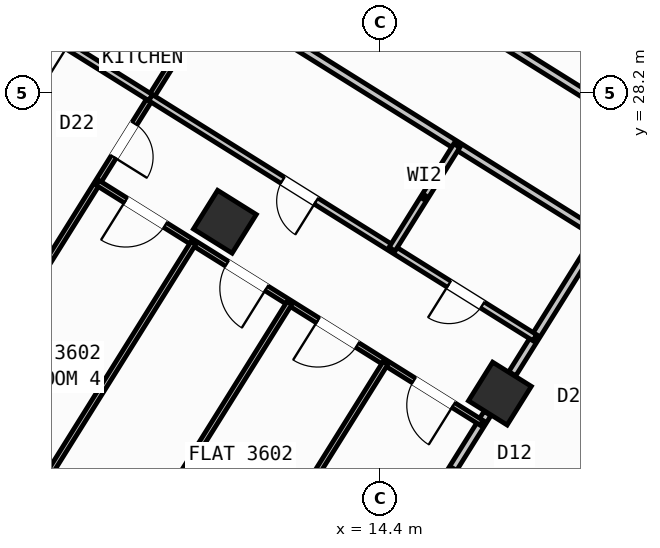
"""IFC4 building model, lengths in metres.
Left out: names, types, materials, properties, quantities, classifications, styles, units other than length and angle.
Written with IfcOpenShell. Run it as: python <this file> out.ifc"""

import sys

from ifc_helpers import new_model, si_unit, direction, frame, frame_2d, origin, origin_2d, place, context, subcontext, project, spatial, rectangle, hollow_rectangle, extrude, source, transform, mapped, element, fill, save


model = new_model("IFC4")
c1 = context("Model", 3, precision=1e-05, world=origin(), true_north=direction((0.0, 1.0)))
c2 = subcontext(c1, "Body", "Model", "MODEL_VIEW")
j1 = project(units=[si_unit("LENGTHUNIT", "METRE"), si_unit("PLANEANGLEUNIT", "RADIAN")], contexts=[c1])
p1 = place(None, origin())
s1 = spatial("IfcSite", under=j1, at=p1, CompositionType="ELEMENT")
p2 = place(p1, origin())
s2 = spatial("IfcBuilding", under=s1, at=p2, CompositionType="ELEMENT")
p3 = place(p2, frame((0.0, 0.0, 144.3)))
s3 = spatial("IfcBuildingStorey", under=s2, at=p3, CompositionType="ELEMENT", Elevation=144.3)
m1 = source(origin(), c2, "Body", "SweptSolid", [
    extrude(hollow_rectangle(XDim=0.9, YDim=0.9, WallThickness=0.036, at=origin_2d()), origin(), (0.0, 0.0, 1.0), 3.6),
])
for number, where, z_axis, x_axis in (
    (1, (16.764, 22.261, 0.0), (0.0, 0.0, 1.0), (-0.848, 0.53, 0.0)),
    (2, (11.336, 25.653, 0.0), (0.0, 0.0, 1.0), (-0.848, 0.53, 0.0)),
):
    element("IfcColumn", number, at=place(p3, frame(where, z_axis=z_axis, x_axis=x_axis)), inside=s3, PredefinedType="COLUMN", context=c2, shape_type="MappedRepresentation", body=[
        mapped(m1, transform((0.0, 0.0, 0.0), scale=1.0)),
    ])
p4 = place(p3, frame((29.268, 6.429, 0.0), z_axis=(0.0, 0.0, 1.0), x_axis=(-0.848049971435, 0.529916263149, 0.0)))
e3 = element("IfcWall", 3, at=p4, inside=s3, PredefinedType="STANDARD", context=c2, shape_type="SweptSolid", body=[
    extrude(rectangle(XDim=31.588, YDim=0.32, at=frame_2d((15.794, 0.0))), origin(), (0.0, 0.0, 1.0), 3.35),
])
p5 = place(p4, frame((16.362, 0.0, 0.0)))
e4 = element("IfcOpeningElement", 4, at=p5, cuts=e3, PredefinedType="OPENING", context=c2, shape_type="SweptSolid", body=[
    extrude(rectangle(XDim=1.2, YDim=2.15, at=frame_2d((0.6, 1.075))), frame((0.0, 0.17, 0.0), z_axis=(0.0, -1.0, 0.0), x_axis=(1.0, 0.0, 0.0)), (0.0, 0.0, 1.0), 0.34),
])
p6 = place(p4, frame((2.989, 0.0, 0.8)))
e5 = element("IfcOpeningElement", 5, at=p6, cuts=e3, PredefinedType="OPENING", context=c2, shape_type="SweptSolid", body=[
    extrude(rectangle(XDim=2.1, YDim=1.55, at=frame_2d((1.05, 0.775))), frame((0.0, 0.17, 0.0), z_axis=(0.0, -1.0, 0.0), x_axis=(1.0, 0.0, 0.0)), (0.0, 0.0, 1.0), 0.34),
])
p7 = place(p4, frame((8.359, 0.0, 0.8)))
e6 = element("IfcOpeningElement", 6, at=p7, cuts=e3, PredefinedType="OPENING", context=c2, shape_type="SweptSolid", body=[
    extrude(rectangle(XDim=2.1, YDim=1.55, at=frame_2d((1.05, 0.775))), frame((0.0, 0.17, 0.0), z_axis=(0.0, -1.0, 0.0), x_axis=(1.0, 0.0, 0.0)), (0.0, 0.0, 1.0), 0.34),
])
p8 = place(p4, frame((13.284, 0.0, 0.95)))
e7 = element("IfcOpeningElement", 7, at=p8, cuts=e3, PredefinedType="OPENING", context=c2, shape_type="SweptSolid", body=[
    extrude(rectangle(XDim=1.2, YDim=1.4, at=frame_2d((0.6, 0.7))), frame((0.0, 0.17, 0.0), z_axis=(0.0, -1.0, 0.0), x_axis=(1.0, 0.0, 0.0)), (0.0, 0.0, 1.0), 0.34),
])
p9 = place(p4, frame((29.188, 0.0, 0.95)))
e8 = element("IfcOpeningElement", 8, at=p9, cuts=e3, PredefinedType="OPENING", context=c2, shape_type="SweptSolid", body=[
    extrude(rectangle(XDim=1.2, YDim=1.4, at=frame_2d((0.6, 0.7))), frame((0.0, 0.17, 0.0), z_axis=(0.0, -1.0, 0.0), x_axis=(1.0, 0.0, 0.0)), (0.0, 0.0, 1.0), 0.34),
])
p10 = place(p4, frame((19.674, 0.0, 1.0)))
e9 = element("IfcOpeningElement", 9, at=p10, cuts=e3, PredefinedType="OPENING", context=c2, shape_type="SweptSolid", body=[
    extrude(rectangle(XDim=0.9, YDim=1.25, at=frame_2d((0.45, 0.625))), frame((0.0, 0.17, 0.0), z_axis=(0.0, -1.0, 0.0), x_axis=(1.0, 0.0, 0.0)), (0.0, 0.0, 1.0), 0.34),
])
p11 = place(p4, frame((21.896, 0.0, 1.0)))
e10 = element("IfcOpeningElement", 10, at=p11, cuts=e3, PredefinedType="OPENING", context=c2, shape_type="SweptSolid", body=[
    extrude(rectangle(XDim=0.9, YDim=1.25, at=frame_2d((0.45, 0.625))), frame((0.0, 0.17, 0.0), z_axis=(0.0, -1.0, 0.0), x_axis=(1.0, 0.0, 0.0)), (0.0, 0.0, 1.0), 0.34),
])
p12 = place(p4, frame((24.106, 0.0, 1.0)))
e11 = element("IfcOpeningElement", 11, at=p12, cuts=e3, PredefinedType="OPENING", context=c2, shape_type="SweptSolid", body=[
    extrude(rectangle(XDim=0.65, YDim=1.15, at=frame_2d((0.325, 0.575))), frame((0.0, 0.17, 0.0), z_axis=(0.0, -1.0, 0.0), x_axis=(1.0, 0.0, 0.0)), (0.0, 0.0, 1.0), 0.34),
])
p13 = place(p4, frame((26.366, 0.0, 1.0)))
e12 = element("IfcOpeningElement", 12, at=p13, cuts=e3, PredefinedType="OPENING", context=c2, shape_type="SweptSolid", body=[
    extrude(rectangle(XDim=0.9, YDim=1.25, at=frame_2d((0.45, 0.625))), frame((0.0, 0.17, 0.0), z_axis=(0.0, -1.0, 0.0), x_axis=(1.0, 0.0, 0.0)), (0.0, 0.0, 1.0), 0.34),
])
p14 = place(p3, frame((2.415, 23.452, 0.0), z_axis=(0.0, 0.0, 1.0), x_axis=(0.52991049553, 0.848053575387, 0.0)))
e13 = element("IfcWall", 13, at=p14, inside=s3, PredefinedType="STANDARD", context=c2, shape_type="SweptSolid", body=[
    extrude(rectangle(XDim=21.587, YDim=0.32, at=frame_2d((10.794, 0.0))), origin(), (0.0, 0.0, 1.0), 2.775),
])
p15 = place(p14, frame((2.356, 0.0, 0.8)))
e14 = element("IfcOpeningElement", 14, at=p15, cuts=e13, PredefinedType="OPENING", context=c2, shape_type="SweptSolid", body=[
    extrude(rectangle(XDim=2.1, YDim=1.55, at=frame_2d((1.05, 0.775))), frame((0.0, 0.17, 0.0), z_axis=(0.0, -1.0, 0.0), x_axis=(1.0, 0.0, 0.0)), (0.0, 0.0, 1.0), 0.34),
])
p16 = place(p14, frame((8.639, 0.0, 1.0)))
e15 = element("IfcOpeningElement", 15, at=p16, cuts=e13, PredefinedType="OPENING", context=c2, shape_type="SweptSolid", body=[
    extrude(rectangle(XDim=0.9, YDim=1.25, at=frame_2d((0.45, 0.625))), frame((0.0, 0.17, 0.0), z_axis=(0.0, -1.0, 0.0), x_axis=(1.0, 0.0, 0.0)), (0.0, 0.0, 1.0), 0.34),
])
p17 = place(p14, frame((17.744, 0.0, 0.85)))
e16 = element("IfcOpeningElement", 16, at=p17, cuts=e13, PredefinedType="OPENING", context=c2, shape_type="SweptSolid", body=[
    extrude(rectangle(XDim=1.5, YDim=1.5, at=frame_2d((0.75, 0.75))), frame((0.0, 0.17, 0.0), z_axis=(0.0, -1.0, 0.0), x_axis=(1.0, 0.0, 0.0)), (0.0, 0.0, 1.0), 0.34),
])
p18 = place(p3, frame((14.138, 41.825, 0.0), z_axis=(0.0, 0.0, 1.0), x_axis=(0.848046498049, -0.529921821731, 0.0)))
e17 = element("IfcWall", 17, at=p18, inside=s3, PredefinedType="STANDARD", context=c2, shape_type="SweptSolid", body=[
    extrude(rectangle(XDim=31.588, YDim=0.32, at=frame_2d((15.794, 0.0))), origin(), (0.0, 0.0, 1.0), 3.35),
])
p19 = place(p18, frame((2.949, 0.0, 0.0)))
e18 = element("IfcOpeningElement", 18, at=p19, cuts=e17, PredefinedType="OPENING", context=c2, shape_type="SweptSolid", body=[
    extrude(rectangle(XDim=1.05, YDim=2.15, at=frame_2d((0.525, 1.075))), frame((0.0, 0.17, 0.0), z_axis=(0.0, -1.0, 0.0), x_axis=(1.0, 0.0, 0.0)), (0.0, 0.0, 1.0), 0.34),
])
p20 = place(p18, frame((0.861, 0.0, 0.85)))
e19 = element("IfcOpeningElement", 19, at=p20, cuts=e17, PredefinedType="OPENING", context=c2, shape_type="SweptSolid", body=[
    extrude(rectangle(XDim=1.5, YDim=1.5, at=frame_2d((0.75, 0.75))), frame((0.0, 0.17, 0.0), z_axis=(0.0, -1.0, 0.0), x_axis=(1.0, 0.0, 0.0)), (0.0, 0.0, 1.0), 0.34),
])
p21 = place(p18, frame((8.494, 0.0, 0.85)))
e20 = element("IfcOpeningElement", 20, at=p21, cuts=e17, PredefinedType="OPENING", context=c2, shape_type="SweptSolid", body=[
    extrude(rectangle(XDim=1.8, YDim=1.5, at=frame_2d((0.9, 0.75))), frame((0.0, 0.17, 0.0), z_axis=(0.0, -1.0, 0.0), x_axis=(1.0, 0.0, 0.0)), (0.0, 0.0, 1.0), 0.34),
])
p22 = place(p18, frame((13.874, 0.0, 0.85)))
e21 = element("IfcOpeningElement", 21, at=p22, cuts=e17, PredefinedType="OPENING", context=c2, shape_type="SweptSolid", body=[
    extrude(rectangle(XDim=1.5, YDim=1.5, at=frame_2d((0.75, 0.75))), frame((0.0, 0.17, 0.0), z_axis=(0.0, -1.0, 0.0), x_axis=(1.0, 0.0, 0.0)), (0.0, 0.0, 1.0), 0.34),
])
p23 = place(p18, frame((17.104, 0.0, 1.0)))
e22 = element("IfcOpeningElement", 22, at=p23, cuts=e17, PredefinedType="OPENING", context=c2, shape_type="SweptSolid", body=[
    extrude(rectangle(XDim=0.9, YDim=1.25, at=frame_2d((0.45, 0.625))), frame((0.0, 0.17, 0.0), z_axis=(0.0, -1.0, 0.0), x_axis=(1.0, 0.0, 0.0)), (0.0, 0.0, 1.0), 0.34),
])
p24 = place(p18, frame((22.144, 0.0, 1.0)))
e23 = element("IfcOpeningElement", 23, at=p24, cuts=e17, PredefinedType="OPENING", context=c2, shape_type="SweptSolid", body=[
    extrude(rectangle(XDim=0.9, YDim=1.25, at=frame_2d((0.45, 0.625))), frame((0.0, 0.17, 0.0), z_axis=(0.0, -1.0, 0.0), x_axis=(1.0, 0.0, 0.0)), (0.0, 0.0, 1.0), 0.34),
])
p25 = place(p18, frame((27.744, 0.0, 1.0)))
e24 = element("IfcOpeningElement", 24, at=p25, cuts=e17, PredefinedType="OPENING", context=c2, shape_type="SweptSolid", body=[
    extrude(rectangle(XDim=0.9, YDim=1.25, at=frame_2d((0.45, 0.625))), frame((0.0, 0.17, 0.0), z_axis=(0.0, -1.0, 0.0), x_axis=(1.0, 0.0, 0.0)), (0.0, 0.0, 1.0), 0.34),
])
p26 = place(p3, frame((21.938, 23.391, 0.0), z_axis=(0.0, 0.0, 1.0), x_axis=(-0.529924725692, -0.848044683434, 0.0)))
e25 = element("IfcWall", 25, at=p26, inside=s3, PredefinedType="PARTITIONING", context=c2, shape_type="SweptSolid", body=[
    extrude(rectangle(XDim=10.35, YDim=0.16, at=frame_2d((5.175, 0.0))), origin(), (0.0, 0.0, 1.0), 3.34),
])
p27 = place(p3, frame((23.104, 25.256, 0.0), z_axis=(0.0, 0.0, 1.0), x_axis=(-0.848041752158, 0.529929416617, 0.0)))
e26 = element("IfcWall", 26, at=p27, inside=s3, PredefinedType="PARTITIONING", context=c2, shape_type="SweptSolid", body=[
    extrude(rectangle(XDim=16.73, YDim=0.16, at=frame_2d((8.365, 0.0))), origin(), (0.0, 0.0, 1.0), 3.34),
])
p28 = place(p27, frame((2.22, 0.0, 0.0)))
e27 = element("IfcOpeningElement", 27, at=p28, cuts=e26, PredefinedType="OPENING", context=c2, shape_type="SweptSolid", body=[
    extrude(rectangle(XDim=0.86, YDim=2.05, at=frame_2d((0.43, 1.025))), frame((0.0, 0.09, 0.0), z_axis=(0.0, -1.0, 0.0), x_axis=(1.0, 0.0, 0.0)), (0.0, 0.0, 1.0), 0.18),
])
p29 = place(p27, frame((12.084, 0.0, 0.0)))
e28 = element("IfcOpeningElement", 28, at=p29, cuts=e26, PredefinedType="OPENING", context=c2, shape_type="SweptSolid", body=[
    extrude(rectangle(XDim=1.0, YDim=2.1, at=frame_2d((0.5, 1.05))), frame((0.0, 0.09, 0.0), z_axis=(0.0, -1.0, 0.0), x_axis=(1.0, 0.0, 0.0)), (0.0, 0.0, 1.0), 0.18),
])
p30 = place(p3, frame((21.938, 23.391, 0.0), z_axis=(0.0, 0.0, 1.0), x_axis=(-0.848045850158, 0.529922858565, 0.0)))
e29 = element("IfcWall", 29, at=p30, inside=s3, PredefinedType="PARTITIONING", context=c2, shape_type="SweptSolid", body=[
    extrude(rectangle(XDim=16.73, YDim=0.16, at=frame_2d((8.365, 0.0))), origin(), (0.0, 0.0, 1.0), 3.34),
])
p31 = place(p30, frame((2.22, 0.0, 0.0)))
e30 = element("IfcOpeningElement", 30, at=p31, cuts=e29, PredefinedType="OPENING", context=c2, shape_type="SweptSolid", body=[
    extrude(rectangle(XDim=0.86, YDim=2.05, at=frame_2d((0.43, 1.025))), frame((0.0, 0.09, 0.0), z_axis=(0.0, -1.0, 0.0), x_axis=(1.0, 0.0, 0.0)), (0.0, 0.0, 1.0), 0.18),
])
p32 = place(p30, frame((14.22, 0.0, 0.0)))
e31 = element("IfcOpeningElement", 31, at=p32, cuts=e29, PredefinedType="OPENING", context=c2, shape_type="SweptSolid", body=[
    extrude(rectangle(XDim=1.0, YDim=2.1, at=frame_2d((0.5, 1.05))), frame((0.0, 0.09, 0.0), z_axis=(0.0, -1.0, 0.0), x_axis=(1.0, 0.0, 0.0)), (0.0, 0.0, 1.0), 0.18),
])
p33 = place(p3, frame((18.724, 25.399, 0.0), z_axis=(0.0, 0.0, 1.0), x_axis=(-0.529890499457, -0.848066069705, 0.0)))
e32 = element("IfcWall", 32, at=p33, inside=s3, PredefinedType="PARTITIONING", context=c2, shape_type="SweptSolid", body=[
    extrude(rectangle(XDim=3.238, YDim=0.16, at=frame_2d((1.619, 0.0))), origin(), (0.0, 0.0, 1.0), 2.775),
])
p34 = place(p3, frame((16.519, 21.87, 0.0), z_axis=(0.0, 0.0, 1.0), x_axis=(-0.529922447305, -0.848046107144, 0.0)))
e33 = element("IfcWall", 33, at=p34, inside=s3, PredefinedType="PARTITIONING", context=c2, shape_type="SweptSolid", body=[
    extrude(rectangle(XDim=5.451, YDim=0.16, at=frame_2d((2.726, 0.0))), origin(), (0.0, 0.0, 1.0), 2.775),
])
p35 = place(p3, frame((20.624, 24.212, 0.0), z_axis=(0.0, 0.0, 1.0), x_axis=(-0.529919283494, -0.848048084121, 0.0)))
e34 = element("IfcWall", 34, at=p35, inside=s3, PredefinedType="PLUMBINGWALL", context=c2, shape_type="SweptSolid", body=[
    extrude(rectangle(XDim=5.51, YDim=0.14, at=frame_2d((2.755, 0.0))), origin(), (0.0, 0.0, 1.0), 2.995),
])
p36 = place(p35, frame((2.365, 0.0, 0.0)))
e35 = element("IfcOpeningElement", 35, at=p36, cuts=e34, PredefinedType="OPENING", context=c2, shape_type="SweptSolid", body=[
    extrude(rectangle(XDim=0.78, YDim=2.05, at=frame_2d((0.39, 1.025))), frame((0.0, 0.08, 0.0), z_axis=(0.0, -1.0, 0.0), x_axis=(1.0, 0.0, 0.0)), (0.0, 0.0, 1.0), 0.16),
])
p37 = place(p3, frame((11.143, 30.136, 0.0), z_axis=(0.0, 0.0, 1.0), x_axis=(-0.529922479612, -0.848046086956, 0.0)))
e36 = element("IfcWall", 36, at=p37, inside=s3, PredefinedType="PARTITIONING", context=c2, shape_type="SweptSolid", body=[
    extrude(rectangle(XDim=10.62, YDim=0.11, at=frame_2d((5.31, 0.0))), origin(), (0.0, 0.0, 1.0), 3.34),
])
p38 = place(p37, frame((3.0, 0.0, 0.0)))
e37 = element("IfcOpeningElement", 37, at=p38, cuts=e36, PredefinedType="OPENING", context=c2, shape_type="SweptSolid", body=[
    extrude(rectangle(XDim=0.78, YDim=2.05, at=frame_2d((0.39, 1.025))), frame((0.0, 0.065, 0.0), z_axis=(0.0, -1.0, 0.0), x_axis=(1.0, 0.0, 0.0)), (0.0, 0.0, 1.0), 0.13),
])
p39 = place(p3, frame((9.871, 28.101, 0.0), z_axis=(0.0, 0.0, 1.0), x_axis=(-0.848025873403, 0.529954826413, 0.0)))
e38 = element("IfcWall", 38, at=p39, inside=s3, PredefinedType="PLUMBINGWALL", context=c2, shape_type="SweptSolid", body=[
    extrude(rectangle(XDim=3.98, YDim=0.14, at=frame_2d((1.99, 0.0))), origin(), (0.0, 0.0, 1.0), 3.34),
])
p40 = place(p39, frame((1.93, 0.0, 0.0)))
e39 = element("IfcOpeningElement", 39, at=p40, cuts=e38, PredefinedType="OPENING", context=c2, shape_type="SweptSolid", body=[
    extrude(rectangle(XDim=0.92, YDim=2.08, at=frame_2d((0.46, 1.04))), frame((0.0, 0.08, 0.0), z_axis=(0.0, -1.0, 0.0), x_axis=(1.0, 0.0, 0.0)), (0.0, 0.0, 1.0), 0.16),
])
p41 = place(p3, frame((17.452, 23.364, 0.0), z_axis=(0.0, 0.0, 1.0), x_axis=(-0.848044326704, 0.52992529657, 0.0)))
e40 = element("IfcWall", 40, at=p41, inside=s3, PredefinedType="PLUMBINGWALL", context=c2, shape_type="SweptSolid", body=[
    extrude(rectangle(XDim=8.94, YDim=0.14, at=frame_2d((4.47, 0.0))), origin(), (0.0, 0.0, 1.0), 3.34),
])
p42 = place(p41, frame((5.087, 0.0, 0.0)))
e41 = element("IfcOpeningElement", 41, at=p42, cuts=e40, PredefinedType="OPENING", context=c2, shape_type="SweptSolid", body=[
    extrude(rectangle(XDim=0.78, YDim=2.05, at=frame_2d((0.39, 1.025))), frame((0.0, 0.08, 0.0), z_axis=(0.0, -1.0, 0.0), x_axis=(1.0, 0.0, 0.0)), (0.0, 0.0, 1.0), 0.16),
])
p43 = place(p41, frame((1.218, 0.0, 0.0)))
e42 = element("IfcOpeningElement", 42, at=p43, cuts=e40, PredefinedType="OPENING", context=c2, shape_type="SweptSolid", body=[
    extrude(rectangle(XDim=0.78, YDim=2.05, at=frame_2d((0.39, 1.025))), frame((0.0, 0.08, 0.0), z_axis=(0.0, -1.0, 0.0), x_axis=(1.0, 0.0, 0.0)), (0.0, 0.0, 1.0), 0.16),
])
p44 = place(p3, frame((15.913, 27.156, 0.0), z_axis=(0.0, 0.0, 1.0), x_axis=(-0.529935194983, -0.848038141311, 0.0)))
e43 = element("IfcWall", 43, at=p44, inside=s3, PredefinedType="PLUMBINGWALL", context=c2, shape_type="SweptSolid", body=[
    extrude(rectangle(XDim=2.41, YDim=0.14, at=frame_2d((1.205, 0.0))), origin(), (0.0, 0.0, 1.0), 3.34),
])
p45 = place(p3, frame((16.403, 21.685, 0.0), z_axis=(0.0, 0.0, 1.0), x_axis=(-0.848044326704, 0.52992529657, 0.0)))
e44 = element("IfcWall", 44, at=p45, inside=s3, PredefinedType="PARTITIONING", context=c2, shape_type="SweptSolid", body=[
    extrude(rectangle(XDim=8.94, YDim=0.11, at=frame_2d((4.47, 0.0))), origin(), (0.0, 0.0, 1.0), 3.34),
])
p46 = place(p45, frame((0.657, 0.0, 0.0)))
e45 = element("IfcOpeningElement", 45, at=p46, cuts=e44, PredefinedType="OPENING", context=c2, shape_type="SweptSolid", body=[
    extrude(rectangle(XDim=0.92, YDim=2.08, at=frame_2d((0.46, 1.04))), frame((0.0, 0.065, 0.0), z_axis=(0.0, -1.0, 0.0), x_axis=(1.0, 0.0, 0.0)), (0.0, 0.0, 1.0), 0.13),
])
p47 = place(p45, frame((2.893, 0.0, 0.0)))
e46 = element("IfcOpeningElement", 46, at=p47, cuts=e44, PredefinedType="OPENING", context=c2, shape_type="SweptSolid", body=[
    extrude(rectangle(XDim=0.92, YDim=2.08, at=frame_2d((0.46, 1.04))), frame((0.0, 0.065, 0.0), z_axis=(0.0, -1.0, 0.0), x_axis=(1.0, 0.0, 0.0)), (0.0, 0.0, 1.0), 0.13),
])
p48 = place(p45, frame((5.008, 0.0, 0.0)))
e47 = element("IfcOpeningElement", 47, at=p48, cuts=e44, PredefinedType="OPENING", context=c2, shape_type="SweptSolid", body=[
    extrude(rectangle(XDim=0.92, YDim=2.08, at=frame_2d((0.46, 1.04))), frame((0.0, 0.065, 0.0), z_axis=(0.0, -1.0, 0.0), x_axis=(1.0, 0.0, 0.0)), (0.0, 0.0, 1.0), 0.13),
])
p49 = place(p45, frame((7.363, 0.0, 0.0)))
e48 = element("IfcOpeningElement", 48, at=p49, cuts=e44, PredefinedType="OPENING", context=c2, shape_type="SweptSolid", body=[
    extrude(rectangle(XDim=0.92, YDim=2.08, at=frame_2d((0.46, 1.04))), frame((0.0, 0.065, 0.0), z_axis=(0.0, -1.0, 0.0), x_axis=(1.0, 0.0, 0.0)), (0.0, 0.0, 1.0), 0.13),
])
for number, where, z_axis, x_axis in (
    (49, (14.508, 22.869, 0.0), (0.0, 0.0, 1.0), (-0.53, -0.848, 0.0)),
    (50, (12.613, 24.053, 0.0), (0.0, 0.0, 1.0), (-0.53, -0.848, 0.0)),
):
    element("IfcWall", number, at=place(p3, frame(where, z_axis=z_axis, x_axis=x_axis)), inside=s3, PredefinedType="PARTITIONING", context=c2, shape_type="SweptSolid", body=[
        extrude(rectangle(XDim=6.24, YDim=0.11, at=frame_2d((3.12, 0.0))), origin(), (0.0, 0.0, 1.0), 2.995),
    ])
p50 = place(p3, frame((10.717, 25.238, 0.0), z_axis=(0.0, 0.0, 1.0), x_axis=(-0.52991804857, -0.848048855786, 0.0)))
e51 = element("IfcWall", 51, at=p50, inside=s3, PredefinedType="PARTITIONING", context=c2, shape_type="SweptSolid", body=[
    extrude(rectangle(XDim=6.24, YDim=0.11, at=frame_2d((3.12, 0.0))), origin(), (0.0, 0.0, 1.0), 3.34),
])
m2 = source(origin(), c2, "Body", "SweptSolid", [
    extrude(rectangle(XDim=0.78, YDim=2.05, at=frame_2d((0.39, 1.025))), frame((0.0, 0.025, 0.0), z_axis=(0.0, -1.0, 0.0), x_axis=(1.0, 0.0, 0.0)), (0.0, 0.0, 1.0), 0.05),
])
p51 = place(p38, origin())
e52 = element("IfcDoor", 52, at=p51, inside=s3, OperationType="SINGLE_SWING_RIGHT", PredefinedType="DOOR", context=c2, shape_type="MappedRepresentation", body=[
    mapped(m2, transform((0.0, 0.0, 0.0), scale=1.0)),
])
fill(e37, e52)
p52 = place(p42, origin())
e53 = element("IfcDoor", 53, at=p52, inside=s3, OperationType="SINGLE_SWING_LEFT", PredefinedType="DOOR", context=c2, shape_type="MappedRepresentation", body=[
    mapped(m2, transform((0.0, 0.0, 0.0), scale=1.0)),
])
fill(e41, e53)
p53 = place(p43, origin())
e54 = element("IfcDoor", 54, at=p53, inside=s3, OperationType="SINGLE_SWING_RIGHT", PredefinedType="DOOR", context=c2, shape_type="MappedRepresentation", body=[
    mapped(m2, transform((0.0, 0.0, 0.0), scale=1.0)),
])
fill(e42, e54)
m3 = source(origin(), c2, "Body", "SweptSolid", [
    extrude(rectangle(XDim=0.92, YDim=2.08, at=frame_2d((0.46, 1.04))), frame((0.0, 0.025, 0.0), z_axis=(0.0, -1.0, 0.0), x_axis=(1.0, 0.0, 0.0)), (0.0, 0.0, 1.0), 0.05),
])
p54 = place(p46, origin())
e55 = element("IfcDoor", 55, at=p54, inside=s3, OperationType="SINGLE_SWING_LEFT", PredefinedType="DOOR", context=c2, shape_type="MappedRepresentation", body=[
    mapped(m3, transform((0.0, 0.0, 0.0), scale=1.0)),
])
fill(e45, e55)
p55 = place(p47, origin())
e56 = element("IfcDoor", 56, at=p55, inside=s3, OperationType="SINGLE_SWING_RIGHT", PredefinedType="DOOR", context=c2, shape_type="MappedRepresentation", body=[
    mapped(m3, transform((0.0, 0.0, 0.0), scale=1.0)),
])
fill(e46, e56)
p56 = place(p48, origin())
e57 = element("IfcDoor", 57, at=p56, inside=s3, OperationType="SINGLE_SWING_LEFT", PredefinedType="DOOR", context=c2, shape_type="MappedRepresentation", body=[
    mapped(m3, transform((0.0, 0.0, 0.0), scale=1.0)),
])
fill(e47, e57)
p57 = place(p49, origin())
e58 = element("IfcDoor", 58, at=p57, inside=s3, OperationType="SINGLE_SWING_RIGHT", PredefinedType="DOOR", context=c2, shape_type="MappedRepresentation", body=[
    mapped(m3, transform((0.0, 0.0, 0.0), scale=1.0)),
])
fill(e48, e58)
save(model, sys.argv[1])
